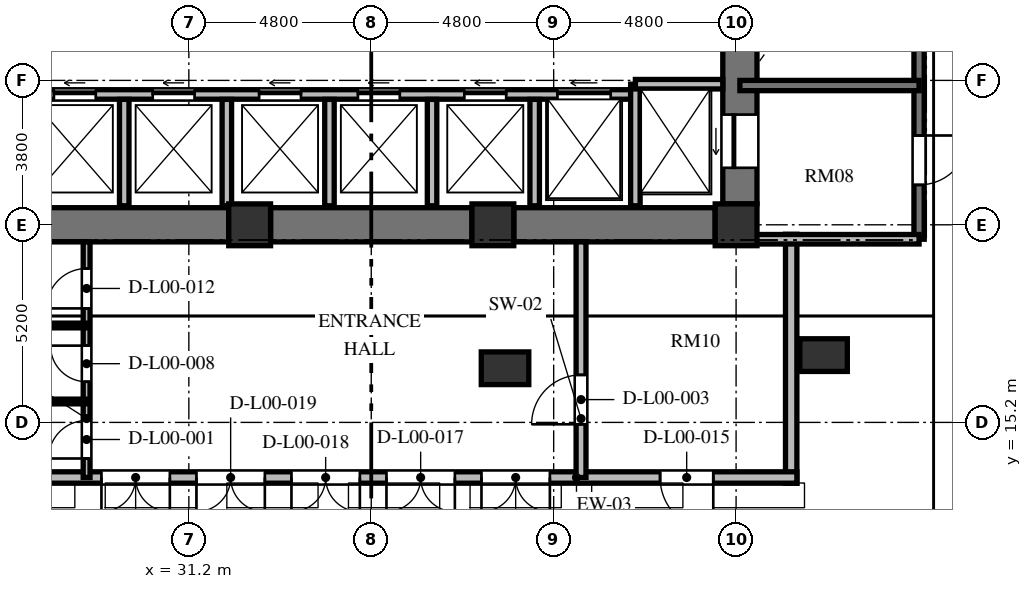
"""IFC4 building model, lengths in metres.
Left out: names, types, materials, properties, quantities, classifications, styles, units other than length and angle.
Written with IfcOpenShell. Run it as: python <this file> out.ifc"""

import sys

from ifc_helpers import new_model, si_unit, direction, frame, frame_2d, origin, origin_2d, place, context, subcontext, project, spatial, rectangle, extrude, element, fill, save


model = new_model("IFC4")
c1 = context("Model", 3, precision=1e-05, world=origin(), true_north=direction((0.0, 1.0)))
c2 = subcontext(c1, "Body", "Model", "MODEL_VIEW")
j1 = project(units=[si_unit("LENGTHUNIT", "METRE"), si_unit("PLANEANGLEUNIT", "RADIAN")], contexts=[c1])
p1 = place(None, origin())
s1 = spatial("IfcSite", under=j1, at=p1, CompositionType="ELEMENT")
p2 = place(p1, origin())
s2 = spatial("IfcBuilding", under=s1, at=p2, CompositionType="ELEMENT")
p3 = place(p2, origin())
s3 = spatial("IfcBuildingStorey", under=s2, at=p3, CompositionType="ELEMENT", Elevation=0.0)
for number, where, z_axis, x_axis in (
    (1, (32.8, 20.4, 0.0), (0.0, 0.0, 1.0), (1.0, 0.0, 0.0)),
    (2, (39.2, 20.4, 0.0), (0.0, 0.0, 1.0), (1.0, 0.0, 0.0)),
    (3, (45.6, 20.4, 0.0), (0.0, 0.0, 1.0), (1.0, 0.0, 0.0)),
):
    element("IfcColumn", number, at=place(p3, frame(where, z_axis=z_axis, x_axis=x_axis)), inside=s3, PredefinedType="COLUMN", context=c2, shape_type="SweptSolid", body=[
        extrude(rectangle(XDim=1.1, YDim=1.1, at=origin_2d()), origin(), (0.0, 0.0, 1.0), 6.0),
    ])
for number, where, z_axis, x_axis in (
    (4, (39.52, 16.625, 0.0), (0.0, 0.0, 1.0), (1.0, 0.0, 0.0)),
    (5, (47.902, 16.971, 0.0), (0.0, 0.0, 1.0), (1.0, 0.0, 0.0)),
):
    element("IfcColumn", number, at=place(p3, frame(where, z_axis=z_axis, x_axis=x_axis)), inside=s3, PredefinedType="COLUMN", context=c2, shape_type="SweptSolid", body=[
        extrude(rectangle(XDim=1.25, YDim=0.86, at=origin_2d()), origin(), (0.0, 0.0, 1.0), 6.0),
    ])
p4 = place(p3, frame((45.7, 20.95, 0.0), z_axis=(0.0, 0.0, 1.0), x_axis=(0.0, 1.0, 0.0)))
e6 = element("IfcWall", 6, at=p4, inside=s3, PredefinedType="SHEAR", context=c2, shape_type="SweptSolid", body=[
    extrude(rectangle(XDim=14.1, YDim=0.9, at=frame_2d((7.05, 0.0))), origin(), (0.0, 0.0, 1.0), 6.0),
])
p5 = place(p4, frame((11.75, 0.0, 0.0)))
e7 = element("IfcOpeningElement", 7, at=p5, cuts=e6, PredefinedType="OPENING", context=c2, shape_type="SweptSolid", body=[
    extrude(rectangle(XDim=1.4, YDim=2.3, at=frame_2d((0.7, 1.15))), frame((0.0, 0.46, 0.0), z_axis=(0.0, -1.0, 0.0), x_axis=(1.0, 0.0, 0.0)), (0.0, 0.0, 1.0), 0.92),
])
p6 = place(p4, frame((0.95, 0.0, 0.0)))
e8 = element("IfcOpeningElement", 8, at=p6, cuts=e6, PredefinedType="OPENING", context=c2, shape_type="SweptSolid", body=[
    extrude(rectangle(XDim=1.4, YDim=2.3, at=frame_2d((0.7, 1.15))), frame((0.0, 0.46, 0.0), z_axis=(0.0, -1.0, 0.0), x_axis=(1.0, 0.0, 0.0)), (0.0, 0.0, 1.0), 0.92),
])
p7 = place(p3, frame((26.95, 20.4, 0.0), z_axis=(0.0, 0.0, 1.0), x_axis=(1.0, 0.0, 0.0)))
e9 = element("IfcWall", 9, at=p7, inside=s3, PredefinedType="SHEAR", context=c2, shape_type="SweptSolid", body=[
    extrude(rectangle(XDim=5.3, YDim=0.9, at=frame_2d((2.65, 0.0))), origin(), (0.0, 0.0, 1.0), 6.0),
])
p8 = place(p3, frame((33.35, 20.4, 0.0), z_axis=(0.0, 0.0, 1.0), x_axis=(1.0, 0.0, 0.0)))
e10 = element("IfcWall", 10, at=p8, inside=s3, PredefinedType="SHEAR", context=c2, shape_type="SweptSolid", body=[
    extrude(rectangle(XDim=5.3, YDim=0.9, at=frame_2d((2.65, 0.0))), origin(), (0.0, 0.0, 1.0), 6.0),
])
p9 = place(p3, frame((39.75, 20.4, 0.0), z_axis=(0.0, 0.0, 1.0), x_axis=(1.0, 0.0, 0.0)))
e11 = element("IfcWall", 11, at=p9, inside=s3, PredefinedType="SHEAR", context=c2, shape_type="SweptSolid", body=[
    extrude(rectangle(XDim=5.3, YDim=0.9, at=frame_2d((2.65, 0.0))), origin(), (0.0, 0.0, 1.0), 6.0),
])
p10 = place(p3, frame((47.05, 20.15, 0.0), z_axis=(0.0, 0.0, 1.0), x_axis=(0.0, -1.0, 0.0)))
e12 = element("IfcWall", 12, at=p10, inside=s3, PredefinedType="SOLIDWALL", context=c2, shape_type="SweptSolid", body=[
    extrude(rectangle(XDim=6.55, YDim=0.3, at=frame_2d((3.275, 0.0))), origin(), (0.0, 0.0, 1.0), 5.72),
])
p11 = place(p3, frame((47.2, 13.75, 0.0), z_axis=(0.0, 0.0, 1.0), x_axis=(-1.0, 0.0, 0.0)))
e13 = element("IfcWall", 13, at=p11, inside=s3, PredefinedType="SOLIDWALL", context=c2, shape_type="SweptSolid", body=[
    extrude(rectangle(XDim=23.2, YDim=0.3, at=frame_2d((11.6, 0.0))), origin(), (0.0, 0.0, 1.0), 5.72),
])
p12 = place(p11, frame((2.2, 0.0, 0.0)))
e14 = element("IfcOpeningElement", 14, at=p12, cuts=e13, PredefinedType="OPENING", context=c2, shape_type="SweptSolid", body=[
    extrude(rectangle(XDim=1.4, YDim=2.25, at=frame_2d((0.7, 1.125))), frame((0.0, 0.16, 0.0), z_axis=(0.0, -1.0, 0.0), x_axis=(1.0, 0.0, 0.0)), (0.0, 0.0, 1.0), 0.32),
])
p13 = place(p11, frame((6.5, 0.0, 0.0)))
e15 = element("IfcOpeningElement", 15, at=p13, cuts=e13, PredefinedType="OPENING", context=c2, shape_type="SweptSolid", body=[
    extrude(rectangle(XDim=1.8, YDim=2.4, at=frame_2d((0.9, 1.2))), frame((0.0, 0.16, 0.0), z_axis=(0.0, -1.0, 0.0), x_axis=(1.0, 0.0, 0.0)), (0.0, 0.0, 1.0), 0.32),
])
p14 = place(p11, frame((9.0, 0.0, 0.0)))
e16 = element("IfcOpeningElement", 16, at=p14, cuts=e13, PredefinedType="OPENING", context=c2, shape_type="SweptSolid", body=[
    extrude(rectangle(XDim=1.8, YDim=2.4, at=frame_2d((0.9, 1.2))), frame((0.0, 0.16, 0.0), z_axis=(0.0, -1.0, 0.0), x_axis=(1.0, 0.0, 0.0)), (0.0, 0.0, 1.0), 0.32),
])
p15 = place(p11, frame((11.5, 0.0, 0.0)))
e17 = element("IfcOpeningElement", 17, at=p15, cuts=e13, PredefinedType="OPENING", context=c2, shape_type="SweptSolid", body=[
    extrude(rectangle(XDim=1.8, YDim=2.4, at=frame_2d((0.9, 1.2))), frame((0.0, 0.16, 0.0), z_axis=(0.0, -1.0, 0.0), x_axis=(1.0, 0.0, 0.0)), (0.0, 0.0, 1.0), 0.32),
])
p16 = place(p11, frame((14.0, 0.0, 0.0)))
e18 = element("IfcOpeningElement", 18, at=p16, cuts=e13, PredefinedType="OPENING", context=c2, shape_type="SweptSolid", body=[
    extrude(rectangle(XDim=1.8, YDim=2.4, at=frame_2d((0.9, 1.2))), frame((0.0, 0.16, 0.0), z_axis=(0.0, -1.0, 0.0), x_axis=(1.0, 0.0, 0.0)), (0.0, 0.0, 1.0), 0.32),
])
p17 = place(p11, frame((16.5, 0.0, 0.0)))
e19 = element("IfcOpeningElement", 19, at=p17, cuts=e13, PredefinedType="OPENING", context=c2, shape_type="SweptSolid", body=[
    extrude(rectangle(XDim=1.8, YDim=2.4, at=frame_2d((0.9, 1.2))), frame((0.0, 0.16, 0.0), z_axis=(0.0, -1.0, 0.0), x_axis=(1.0, 0.0, 0.0)), (0.0, 0.0, 1.0), 0.32),
])
p18 = place(p3, frame((26.75, 23.83, 0.0), z_axis=(0.0, 0.0, 1.0), x_axis=(1.0, 0.0, 0.0)))
e20 = element("IfcWall", 20, at=p18, inside=s3, PredefinedType="SOLIDWALL", context=c2, shape_type="SweptSolid", body=[
    extrude(rectangle(XDim=16.2, YDim=0.25, at=frame_2d((8.1, 0.0))), origin(), (0.0, 0.0, 1.0), 5.72),
])
p19 = place(p18, frame((0.9, 0.0, 0.0)))
e21 = element("IfcOpeningElement", 21, at=p19, cuts=e20, PredefinedType="OPENING", context=c2, shape_type="SweptSolid", body=[
    extrude(rectangle(XDim=1.1, YDim=2.2, at=frame_2d((0.55, 1.1))), frame((0.0, 0.135, 0.0), z_axis=(0.0, -1.0, 0.0), x_axis=(1.0, 0.0, 0.0)), (0.0, 0.0, 1.0), 0.27),
])
p20 = place(p18, frame((3.5, 0.0, 0.0)))
e22 = element("IfcOpeningElement", 22, at=p20, cuts=e20, PredefinedType="OPENING", context=c2, shape_type="SweptSolid", body=[
    extrude(rectangle(XDim=1.1, YDim=2.2, at=frame_2d((0.55, 1.1))), frame((0.0, 0.135, 0.0), z_axis=(0.0, -1.0, 0.0), x_axis=(1.0, 0.0, 0.0)), (0.0, 0.0, 1.0), 0.27),
])
p21 = place(p18, frame((6.3, 0.0, 0.0)))
e23 = element("IfcOpeningElement", 23, at=p21, cuts=e20, PredefinedType="OPENING", context=c2, shape_type="SweptSolid", body=[
    extrude(rectangle(XDim=1.1, YDim=2.2, at=frame_2d((0.55, 1.1))), frame((0.0, 0.135, 0.0), z_axis=(0.0, -1.0, 0.0), x_axis=(1.0, 0.0, 0.0)), (0.0, 0.0, 1.0), 0.27),
])
p22 = place(p18, frame((8.9, 0.0, 0.0)))
e24 = element("IfcOpeningElement", 24, at=p22, cuts=e20, PredefinedType="OPENING", context=c2, shape_type="SweptSolid", body=[
    extrude(rectangle(XDim=1.1, YDim=2.2, at=frame_2d((0.55, 1.1))), frame((0.0, 0.135, 0.0), z_axis=(0.0, -1.0, 0.0), x_axis=(1.0, 0.0, 0.0)), (0.0, 0.0, 1.0), 0.27),
])
p23 = place(p18, frame((11.7, 0.0, 0.0)))
e25 = element("IfcOpeningElement", 25, at=p23, cuts=e20, PredefinedType="OPENING", context=c2, shape_type="SweptSolid", body=[
    extrude(rectangle(XDim=1.1, YDim=2.2, at=frame_2d((0.55, 1.1))), frame((0.0, 0.135, 0.0), z_axis=(0.0, -1.0, 0.0), x_axis=(1.0, 0.0, 0.0)), (0.0, 0.0, 1.0), 0.27),
])
p24 = place(p18, frame((14.15, 0.0, 0.0)))
e26 = element("IfcOpeningElement", 26, at=p24, cuts=e20, PredefinedType="OPENING", context=c2, shape_type="SweptSolid", body=[
    extrude(rectangle(XDim=1.4, YDim=2.3, at=frame_2d((0.7, 1.15))), frame((0.0, 0.135, 0.0), z_axis=(0.0, -1.0, 0.0), x_axis=(1.0, 0.0, 0.0)), (0.0, 0.0, 1.0), 0.27),
])
p25 = place(p3, frame((42.95, 20.9, 0.0), z_axis=(0.0, 0.0, 1.0), x_axis=(0.0, 1.0, 0.0)))
e27 = element("IfcWall", 27, at=p25, inside=s3, PredefinedType="SOLIDWALL", context=c2, shape_type="SweptSolid", body=[
    extrude(rectangle(XDim=3.2, YDim=0.25, at=frame_2d((1.6, 0.0))), origin(), (0.0, 0.0, 1.0), 5.72),
])
p26 = place(p3, frame((42.95, 24.1, 0.0), z_axis=(0.0, 0.0, 1.0), x_axis=(1.0, 0.0, 0.0)))
e28 = element("IfcWall", 28, at=p26, inside=s3, PredefinedType="SOLIDWALL", context=c2, shape_type="SweptSolid", body=[
    extrude(rectangle(XDim=2.3, YDim=0.25, at=frame_2d((1.15, 0.0))), origin(), (0.0, 0.0, 1.0), 5.72),
])
for number, where, z_axis, x_axis in (
    (29, (29.5, 20.9, 0.0), (0.0, 0.0, 1.0), (0.0, 1.0, 0.0)),
    (30, (32.2, 20.9, 0.0), (0.0, 0.0, 1.0), (0.0, 1.0, 0.0)),
    (31, (34.9, 20.9, 0.0), (0.0, 0.0, 1.0), (0.0, 1.0, 0.0)),
    (32, (37.6, 20.9, 0.0), (0.0, 0.0, 1.0), (0.0, 1.0, 0.0)),
    (33, (40.3, 20.9, 0.0), (0.0, 0.0, 1.0), (0.0, 1.0, 0.0)),
):
    element("IfcWall", number, at=place(p3, frame(where, z_axis=z_axis, x_axis=x_axis)), inside=s3, PredefinedType="SOLIDWALL", context=c2, shape_type="SweptSolid", body=[
        extrude(rectangle(XDim=2.8, YDim=0.25, at=frame_2d((1.4, 0.0))), origin(), (0.0, 0.0, 1.0), 5.72),
    ])
p27 = place(p3, frame((50.415, 35.845, 0.0), z_axis=(0.0, 0.0, 1.0), x_axis=(0.0, -1.0, 0.0)))
e34 = element("IfcWall", 34, at=p27, inside=s3, PredefinedType="SHEAR", context=c2, shape_type="SweptSolid", body=[
    extrude(rectangle(XDim=15.825, YDim=0.27, at=frame_2d((7.913, 0.0))), origin(), (0.0, 0.0, 1.0), 6.0),
])
p28 = place(p27, frame((4.345, 0.0, 0.0)))
e35 = element("IfcOpeningElement", 35, at=p28, cuts=e34, PredefinedType="OPENING", context=c2, shape_type="SweptSolid", body=[
    extrude(rectangle(XDim=1.4, YDim=2.25, at=frame_2d((0.7, 1.125))), frame((0.0, 0.145, 0.0), z_axis=(0.0, -1.0, 0.0), x_axis=(1.0, 0.0, 0.0)), (0.0, 0.0, 1.0), 0.29),
])
p29 = place(p27, frame((1.295, 0.0, 0.0)))
e36 = element("IfcOpeningElement", 36, at=p29, cuts=e34, PredefinedType="OPENING", context=c2, shape_type="SweptSolid", body=[
    extrude(rectangle(XDim=1.3, YDim=2.2, at=frame_2d((0.65, 1.1))), frame((0.0, 0.145, 0.0), z_axis=(0.0, -1.0, 0.0), x_axis=(1.0, 0.0, 0.0)), (0.0, 0.0, 1.0), 0.29),
])
p30 = place(p27, frame((13.095, 0.0, 0.0)))
e37 = element("IfcOpeningElement", 37, at=p30, cuts=e34, PredefinedType="OPENING", context=c2, shape_type="SweptSolid", body=[
    extrude(rectangle(XDim=1.3, YDim=2.2, at=frame_2d((0.65, 1.1))), frame((0.0, 0.145, 0.0), z_axis=(0.0, -1.0, 0.0), x_axis=(1.0, 0.0, 0.0)), (0.0, 0.0, 1.0), 0.29),
])
p31 = place(p3, frame((45.7, 24.065, 0.0), z_axis=(0.0, 0.0, 1.0), x_axis=(1.0, 0.0, 0.0)))
e38 = element("IfcWall", 38, at=p31, inside=s3, PredefinedType="SHEAR", context=c2, shape_type="SweptSolid", body=[
    extrude(rectangle(XDim=4.715, YDim=0.27, at=frame_2d((2.357, 0.0))), origin(), (0.0, 0.0, 1.0), 6.0),
])
p32 = place(p3, frame((45.7, 20.02, 0.0), z_axis=(0.0, 0.0, 1.0), x_axis=(1.0, 0.0, 0.0)))
e39 = element("IfcWall", 39, at=p32, inside=s3, PredefinedType="SOLIDWALL", context=c2, shape_type="SweptSolid", body=[
    extrude(rectangle(XDim=4.715, YDim=0.25, at=frame_2d((2.357, 0.0))), origin(), (0.0, 0.0, 1.0), 5.72),
])
p33 = place(p3, frame((41.52, 13.75, 0.0), z_axis=(0.0, 0.0, 1.0), x_axis=(0.0, 1.0, 0.0)))
e40 = element("IfcWall", 40, at=p33, inside=s3, PredefinedType="SOLIDWALL", context=c2, shape_type="SweptSolid", body=[
    extrude(rectangle(XDim=6.2, YDim=0.26, at=frame_2d((3.1, 0.0))), origin(), (0.0, 0.0, 1.0), 5.72),
])
p34 = place(p33, frame((1.4, 0.0, 0.0)))
e41 = element("IfcOpeningElement", 41, at=p34, cuts=e40, PredefinedType="OPENING", context=c2, shape_type="SweptSolid", body=[
    extrude(rectangle(XDim=1.3, YDim=2.2, at=frame_2d((0.65, 1.1))), frame((0.0, 0.14, 0.0), z_axis=(0.0, -1.0, 0.0), x_axis=(1.0, 0.0, 0.0)), (0.0, 0.0, 1.0), 0.28),
])
p35 = place(p3, frame((28.51, 13.75, 0.0), z_axis=(0.0, 0.0, 1.0), x_axis=(0.0, 1.0, 0.0)))
e42 = element("IfcWall", 42, at=p35, inside=s3, PredefinedType="PARTITIONING", context=c2, shape_type="SweptSolid", body=[
    extrude(rectangle(XDim=6.2, YDim=0.18, at=frame_2d((3.1, 0.0))), origin(), (0.0, 0.0, 1.0), 5.72),
])
p36 = place(p35, frame((0.5, 0.0, 0.0)))
e43 = element("IfcOpeningElement", 43, at=p36, cuts=e42, PredefinedType="OPENING", context=c2, shape_type="SweptSolid", body=[
    extrude(rectangle(XDim=1.0, YDim=2.1, at=frame_2d((0.5, 1.05))), frame((0.0, 0.1, 0.0), z_axis=(0.0, -1.0, 0.0), x_axis=(1.0, 0.0, 0.0)), (0.0, 0.0, 1.0), 0.2),
])
p37 = place(p35, frame((2.52, 0.0, 0.0)))
e44 = element("IfcOpeningElement", 44, at=p37, cuts=e42, PredefinedType="OPENING", context=c2, shape_type="SweptSolid", body=[
    extrude(rectangle(XDim=0.95, YDim=2.1, at=frame_2d((0.475, 1.05))), frame((0.0, 0.1, 0.0), z_axis=(0.0, -1.0, 0.0), x_axis=(1.0, 0.0, 0.0)), (0.0, 0.0, 1.0), 0.2),
])
p38 = place(p35, frame((4.45, 0.0, 0.0)))
e45 = element("IfcOpeningElement", 45, at=p38, cuts=e42, PredefinedType="OPENING", context=c2, shape_type="SweptSolid", body=[
    extrude(rectangle(XDim=1.05, YDim=2.15, at=frame_2d((0.525, 1.075))), frame((0.0, 0.1, 0.0), z_axis=(0.0, -1.0, 0.0), x_axis=(1.0, 0.0, 0.0)), (0.0, 0.0, 1.0), 0.2),
])
for number, where, z_axis, x_axis in (
    (46, (24.15, 15.75, 0.0), (0.0, 0.0, 1.0), (1.0, 0.0, 0.0)),
    (47, (24.15, 17.75, 0.0), (0.0, 0.0, 1.0), (1.0, 0.0, 0.0)),
):
    element("IfcWall", number, at=place(p3, frame(where, z_axis=z_axis, x_axis=x_axis)), inside=s3, PredefinedType="PARTITIONING", context=c2, shape_type="SweptSolid", body=[
        extrude(rectangle(XDim=4.36, YDim=0.125, at=frame_2d((2.18, 0.0))), origin(), (0.0, 0.0, 1.0), 5.72),
    ])
p39 = place(p12, origin())
e48 = element("IfcDoor", 48, at=p39, inside=s3, OperationType="SINGLE_SWING_LEFT", PredefinedType="DOOR", context=c2, shape_type="SweptSolid", body=[
    extrude(rectangle(XDim=1.4, YDim=2.25, at=frame_2d((0.7, 1.125))), frame((0.0, 0.025, 0.0), z_axis=(0.0, -1.0, 0.0), x_axis=(1.0, 0.0, 0.0)), (0.0, 0.0, 1.0), 0.05),
])
fill(e14, e48)
p40 = place(p13, origin())
e49 = element("IfcDoor", 49, at=p40, inside=s3, OperationType="DOUBLE_DOOR_SINGLE_SWING", PredefinedType="DOOR", context=c2, shape_type="SweptSolid", body=[
    extrude(rectangle(XDim=1.8, YDim=2.4, at=frame_2d((0.9, 1.2))), frame((0.0, 0.025, 0.0), z_axis=(0.0, -1.0, 0.0), x_axis=(1.0, 0.0, 0.0)), (0.0, 0.0, 1.0), 0.05),
])
fill(e15, e49)
p41 = place(p14, origin())
e50 = element("IfcDoor", 50, at=p41, inside=s3, OperationType="DOUBLE_DOOR_SINGLE_SWING", PredefinedType="DOOR", context=c2, shape_type="SweptSolid", body=[
    extrude(rectangle(XDim=1.8, YDim=2.4, at=frame_2d((0.9, 1.2))), frame((0.0, 0.025, 0.0), z_axis=(0.0, -1.0, 0.0), x_axis=(1.0, 0.0, 0.0)), (0.0, 0.0, 1.0), 0.05),
])
fill(e16, e50)
p42 = place(p15, origin())
e51 = element("IfcDoor", 51, at=p42, inside=s3, OperationType="DOUBLE_DOOR_SINGLE_SWING", PredefinedType="DOOR", context=c2, shape_type="SweptSolid", body=[
    extrude(rectangle(XDim=1.8, YDim=2.4, at=frame_2d((0.9, 1.2))), frame((0.0, 0.025, 0.0), z_axis=(0.0, -1.0, 0.0), x_axis=(1.0, 0.0, 0.0)), (0.0, 0.0, 1.0), 0.05),
])
fill(e17, e51)
p43 = place(p16, origin())
e52 = element("IfcDoor", 52, at=p43, inside=s3, OperationType="DOUBLE_DOOR_SINGLE_SWING", PredefinedType="DOOR", context=c2, shape_type="SweptSolid", body=[
    extrude(rectangle(XDim=1.8, YDim=2.4, at=frame_2d((0.9, 1.2))), frame((0.0, 0.025, 0.0), z_axis=(0.0, -1.0, 0.0), x_axis=(1.0, 0.0, 0.0)), (0.0, 0.0, 1.0), 0.05),
])
fill(e18, e52)
p44 = place(p17, origin())
e53 = element("IfcDoor", 53, at=p44, inside=s3, OperationType="DOUBLE_DOOR_SINGLE_SWING", PredefinedType="DOOR", context=c2, shape_type="SweptSolid", body=[
    extrude(rectangle(XDim=1.8, YDim=2.4, at=frame_2d((0.9, 1.2))), frame((0.0, 0.025, 0.0), z_axis=(0.0, -1.0, 0.0), x_axis=(1.0, 0.0, 0.0)), (0.0, 0.0, 1.0), 0.05),
])
fill(e19, e53)
p45 = place(p19, origin())
e54 = element("IfcDoor", 54, at=p45, inside=s3, OperationType="SLIDING_TO_LEFT", PredefinedType="DOOR", context=c2, shape_type="SweptSolid", body=[
    extrude(rectangle(XDim=1.1, YDim=2.2, at=frame_2d((0.55, 1.1))), frame((0.0, 0.025, 0.0), z_axis=(0.0, -1.0, 0.0), x_axis=(1.0, 0.0, 0.0)), (0.0, 0.0, 1.0), 0.05),
])
fill(e21, e54)
p46 = place(p20, origin())
e55 = element("IfcDoor", 55, at=p46, inside=s3, OperationType="SLIDING_TO_LEFT", PredefinedType="DOOR", context=c2, shape_type="SweptSolid", body=[
    extrude(rectangle(XDim=1.1, YDim=2.2, at=frame_2d((0.55, 1.1))), frame((0.0, 0.025, 0.0), z_axis=(0.0, -1.0, 0.0), x_axis=(1.0, 0.0, 0.0)), (0.0, 0.0, 1.0), 0.05),
])
fill(e22, e55)
p47 = place(p21, origin())
e56 = element("IfcDoor", 56, at=p47, inside=s3, OperationType="SLIDING_TO_LEFT", PredefinedType="DOOR", context=c2, shape_type="SweptSolid", body=[
    extrude(rectangle(XDim=1.1, YDim=2.2, at=frame_2d((0.55, 1.1))), frame((0.0, 0.025, 0.0), z_axis=(0.0, -1.0, 0.0), x_axis=(1.0, 0.0, 0.0)), (0.0, 0.0, 1.0), 0.05),
])
fill(e23, e56)
p48 = place(p22, origin())
e57 = element("IfcDoor", 57, at=p48, inside=s3, OperationType="SLIDING_TO_LEFT", PredefinedType="DOOR", context=c2, shape_type="SweptSolid", body=[
    extrude(rectangle(XDim=1.1, YDim=2.2, at=frame_2d((0.55, 1.1))), frame((0.0, 0.025, 0.0), z_axis=(0.0, -1.0, 0.0), x_axis=(1.0, 0.0, 0.0)), (0.0, 0.0, 1.0), 0.05),
])
fill(e24, e57)
p49 = place(p23, origin())
e58 = element("IfcDoor", 58, at=p49, inside=s3, OperationType="SLIDING_TO_LEFT", PredefinedType="DOOR", context=c2, shape_type="SweptSolid", body=[
    extrude(rectangle(XDim=1.1, YDim=2.2, at=frame_2d((0.55, 1.1))), frame((0.0, 0.025, 0.0), z_axis=(0.0, -1.0, 0.0), x_axis=(1.0, 0.0, 0.0)), (0.0, 0.0, 1.0), 0.05),
])
fill(e25, e58)
p50 = place(p6, origin())
e59 = element("IfcDoor", 59, at=p50, inside=s3, OperationType="SLIDING_TO_LEFT", PredefinedType="DOOR", context=c2, shape_type="SweptSolid", body=[
    extrude(rectangle(XDim=1.4, YDim=2.3, at=frame_2d((0.7, 1.15))), frame((0.0, 0.025, 0.0), z_axis=(0.0, -1.0, 0.0), x_axis=(1.0, 0.0, 0.0)), (0.0, 0.0, 1.0), 0.05),
])
fill(e8, e59)
p51 = place(p24, origin())
e60 = element("IfcDoor", 60, at=p51, inside=s3, OperationType="SLIDING_TO_LEFT", PredefinedType="DOOR", context=c2, shape_type="SweptSolid", body=[
    extrude(rectangle(XDim=1.4, YDim=2.3, at=frame_2d((0.7, 1.15))), frame((0.0, 0.025, 0.0), z_axis=(0.0, -1.0, 0.0), x_axis=(1.0, 0.0, 0.0)), (0.0, 0.0, 1.0), 0.05),
])
fill(e26, e60)
p52 = place(p30, origin())
e61 = element("IfcDoor", 61, at=p52, inside=s3, OperationType="SINGLE_SWING_LEFT", PredefinedType="DOOR", context=c2, shape_type="SweptSolid", body=[
    extrude(rectangle(XDim=1.3, YDim=2.2, at=frame_2d((0.65, 1.1))), frame((0.0, 0.025, 0.0), z_axis=(0.0, -1.0, 0.0), x_axis=(1.0, 0.0, 0.0)), (0.0, 0.0, 1.0), 0.05),
])
fill(e37, e61)
p53 = place(p34, origin())
e62 = element("IfcDoor", 62, at=p53, inside=s3, OperationType="SINGLE_SWING_LEFT", PredefinedType="DOOR", context=c2, shape_type="SweptSolid", body=[
    extrude(rectangle(XDim=1.3, YDim=2.2, at=frame_2d((0.65, 1.1))), frame((0.0, 0.025, 0.0), z_axis=(0.0, -1.0, 0.0), x_axis=(1.0, 0.0, 0.0)), (0.0, 0.0, 1.0), 0.05),
])
fill(e41, e62)
p54 = place(p36, origin())
e63 = element("IfcDoor", 63, at=p54, inside=s3, OperationType="SINGLE_SWING_LEFT", PredefinedType="DOOR", context=c2, shape_type="SweptSolid", body=[
    extrude(rectangle(XDim=1.0, YDim=2.1, at=frame_2d((0.5, 1.05))), frame((0.0, 0.025, 0.0), z_axis=(0.0, -1.0, 0.0), x_axis=(1.0, 0.0, 0.0)), (0.0, 0.0, 1.0), 0.05),
])
fill(e43, e63)
p55 = place(p37, origin())
e64 = element("IfcDoor", 64, at=p55, inside=s3, OperationType="SINGLE_SWING_RIGHT", PredefinedType="DOOR", context=c2, shape_type="SweptSolid", body=[
    extrude(rectangle(XDim=0.95, YDim=2.1, at=frame_2d((0.475, 1.05))), frame((0.0, 0.025, 0.0), z_axis=(0.0, -1.0, 0.0), x_axis=(1.0, 0.0, 0.0)), (0.0, 0.0, 1.0), 0.05),
])
fill(e44, e64)
p56 = place(p38, origin())
e65 = element("IfcDoor", 65, at=p56, inside=s3, OperationType="SINGLE_SWING_LEFT", PredefinedType="DOOR", context=c2, shape_type="SweptSolid", body=[
    extrude(rectangle(XDim=1.05, YDim=2.15, at=frame_2d((0.525, 1.075))), frame((0.0, 0.025, 0.0), z_axis=(0.0, -1.0, 0.0), x_axis=(1.0, 0.0, 0.0)), (0.0, 0.0, 1.0), 0.05),
])
fill(e45, e65)
save(model, sys.argv[1])
